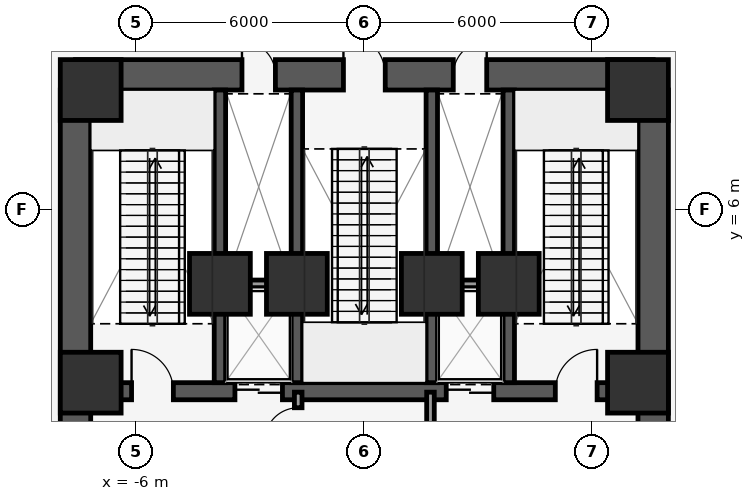
"""IFC4 building model, lengths in metres.
Left out: names, types, materials, properties, quantities, classifications, styles, units other than length and angle.
Written with IfcOpenShell. Run it as: python <this file> out.ifc"""

import sys

from ifc_helpers import new_model, si_unit, direction, frame, frame_2d, origin, origin_2d, place, context, subcontext, project, spatial, rectangle, extrude, element, fill, save


model = new_model("IFC4")
c1 = context("Model", 3, precision=1e-05, world=origin(), true_north=direction((0.0, 1.0)))
c2 = subcontext(c1, "Body", "Model", "MODEL_VIEW")
j1 = project(units=[si_unit("LENGTHUNIT", "METRE"), si_unit("PLANEANGLEUNIT", "RADIAN")], contexts=[c1])
p1 = place(None, origin())
s1 = spatial("IfcSite", under=j1, at=p1, CompositionType="ELEMENT")
p2 = place(p1, origin())
s2 = spatial("IfcBuilding", under=s1, at=p2, CompositionType="ELEMENT")
p3 = place(p2, frame((0.0, 0.0, 17.5)))
s3 = spatial("IfcBuildingStorey", under=s2, at=p3, CompositionType="ELEMENT", Elevation=17.5)
p4 = place(p3, frame((-7.6, 9.55, 0.0), z_axis=(0.0, 0.0, 1.0), x_axis=(1.0, 0.0, 0.0)))
e1 = element("IfcWall", 1, at=p4, inside=s3, PredefinedType="SHEAR", context=c2, shape_type="SweptSolid", body=[
    extrude(rectangle(XDim=15.2, YDim=0.8, at=frame_2d((7.6, 0.0))), origin(), (0.0, 0.0, 1.0), 5.7),
])
p5 = place(p4, frame((7.05, 0.0, 0.0)))
e2 = element("IfcOpeningElement", 2, at=p5, cuts=e1, PredefinedType="OPENING", context=c2, shape_type="SweptSolid", body=[
    extrude(rectangle(XDim=1.1, YDim=2.15, at=frame_2d((0.55, 1.075))), frame((0.0, 0.41, 0.0), z_axis=(0.0, -1.0, 0.0), x_axis=(1.0, 0.0, 0.0)), (0.0, 0.0, 1.0), 0.82),
])
p6 = place(p4, frame((4.38, 0.0, 0.0)))
e3 = element("IfcOpeningElement", 3, at=p6, cuts=e1, PredefinedType="OPENING", context=c2, shape_type="SweptSolid", body=[
    extrude(rectangle(XDim=0.88, YDim=2.15, at=frame_2d((0.44, 1.075))), frame((0.0, 0.41, 0.0), z_axis=(0.0, -1.0, 0.0), x_axis=(1.0, 0.0, 0.0)), (0.0, 0.0, 1.0), 0.82),
])
p7 = place(p4, frame((9.94, 0.0, 0.0)))
e4 = element("IfcOpeningElement", 4, at=p7, cuts=e1, PredefinedType="OPENING", context=c2, shape_type="SweptSolid", body=[
    extrude(rectangle(XDim=0.88, YDim=2.15, at=frame_2d((0.44, 1.075))), frame((0.0, 0.41, 0.0), z_axis=(0.0, -1.0, 0.0), x_axis=(1.0, 0.0, 0.0)), (0.0, 0.0, 1.0), 0.82),
])
p8 = place(p3, frame((-7.2, 1.225, 0.0), z_axis=(0.0, 0.0, 1.0), x_axis=(1.0, 0.0, 0.0)))
e5 = element("IfcWall", 5, at=p8, inside=s3, PredefinedType="SHEAR", context=c2, shape_type="SweptSolid", body=[
    extrude(rectangle(XDim=14.4, YDim=0.45, at=frame_2d((7.2, 0.0))), origin(), (0.0, 0.0, 1.0), 5.7),
])
p9 = place(p8, frame((3.795, 0.0, 0.0)))
e6 = element("IfcOpeningElement", 6, at=p9, cuts=e5, PredefinedType="OPENING", context=c2, shape_type="SweptSolid", body=[
    extrude(rectangle(XDim=1.25, YDim=2.25, at=frame_2d((0.625, 1.125))), frame((0.0, 0.235, 0.0), z_axis=(0.0, -1.0, 0.0), x_axis=(1.0, 0.0, 0.0)), (0.0, 0.0, 1.0), 0.47),
])
p10 = place(p8, frame((9.355, 0.0, 0.0)))
e7 = element("IfcOpeningElement", 7, at=p10, cuts=e5, PredefinedType="OPENING", context=c2, shape_type="SweptSolid", body=[
    extrude(rectangle(XDim=1.25, YDim=2.25, at=frame_2d((0.625, 1.125))), frame((0.0, 0.235, 0.0), z_axis=(0.0, -1.0, 0.0), x_axis=(1.0, 0.0, 0.0)), (0.0, 0.0, 1.0), 0.47),
])
p11 = place(p8, frame((1.075, 0.0, 0.0)))
e8 = element("IfcOpeningElement", 8, at=p11, cuts=e5, PredefinedType="OPENING", context=c2, shape_type="SweptSolid", body=[
    extrude(rectangle(XDim=1.1, YDim=2.15, at=frame_2d((0.55, 1.075))), frame((0.0, 0.235, 0.0), z_axis=(0.0, -1.0, 0.0), x_axis=(1.0, 0.0, 0.0)), (0.0, 0.0, 1.0), 0.47),
])
p12 = place(p8, frame((12.225, 0.0, 0.0)))
e9 = element("IfcOpeningElement", 9, at=p12, cuts=e5, PredefinedType="OPENING", context=c2, shape_type="SweptSolid", body=[
    extrude(rectangle(XDim=1.1, YDim=2.15, at=frame_2d((0.55, 1.075))), frame((0.0, 0.235, 0.0), z_axis=(0.0, -1.0, 0.0), x_axis=(1.0, 0.0, 0.0)), (0.0, 0.0, 1.0), 0.47),
])
for number, where, z_axis, x_axis in (
    (10, (-3.8, 1.45, 0.0), (0.0, 0.0, 1.0), (0.0, 1.0, 0.0)),
    (11, (-1.775, 1.45, 0.0), (0.0, 0.0, 1.0), (0.0, 1.0, 0.0)),
    (12, (1.775, 1.45, 0.0), (0.0, 0.0, 1.0), (0.0, 1.0, 0.0)),
    (13, (3.8, 1.45, 0.0), (0.0, 0.0, 1.0), (0.0, 1.0, 0.0)),
):
    element("IfcWall", number, at=place(p3, frame(where, z_axis=z_axis, x_axis=x_axis)), inside=s3, PredefinedType="SHEAR", context=c2, shape_type="SweptSolid", body=[
        extrude(rectangle(XDim=7.7, YDim=0.3, at=frame_2d((3.85, 0.0))), origin(), (0.0, 0.0, 1.0), 5.7),
    ])
for number, where, z_axis, x_axis in (
    (14, (-7.6, 0.1, 0.0), (0.0, 0.0, 1.0), (0.0, 1.0, 0.0)),
    (15, (7.6, 0.1, 0.0), (0.0, 0.0, 1.0), (0.0, 1.0, 0.0)),
):
    element("IfcWall", number, at=place(p3, frame(where, z_axis=z_axis, x_axis=x_axis)), inside=s3, PredefinedType="SHEAR", context=c2, shape_type="SweptSolid", body=[
        extrude(rectangle(XDim=9.05, YDim=0.8, at=frame_2d((4.525, 0.0))), origin(), (0.0, 0.0, 1.0), 5.7),
    ])
for number, where, z_axis, x_axis in (
    (16, (7.2, 1.45, 0.0), (0.0, 0.0, 1.0), (1.0, 0.0, 0.0)),
    (17, (7.2, 9.15, 0.0), (0.0, 0.0, 1.0), (1.0, 0.0, 0.0)),
    (18, (-7.2, 9.15, 0.0), (0.0, 0.0, 1.0), (1.0, 0.0, 0.0)),
    (19, (-7.2, 1.45, 0.0), (0.0, 0.0, 1.0), (1.0, 0.0, 0.0)),
    (20, (-3.8, 4.05, 0.0), (0.0, 0.0, 1.0), (1.0, 0.0, 0.0)),
    (21, (3.8, 4.05, 0.0), (0.0, 0.0, 1.0), (1.0, 0.0, 0.0)),
    (22, (-1.775, 4.05, 0.0), (0.0, 0.0, 1.0), (1.0, 0.0, 0.0)),
    (23, (1.775, 4.05, 0.0), (0.0, 0.0, 1.0), (1.0, 0.0, 0.0)),
):
    element("IfcColumn", number, at=place(p3, frame(where, z_axis=z_axis, x_axis=x_axis)), inside=s3, PredefinedType="COLUMN", context=c2, shape_type="SweptSolid", body=[
        extrude(rectangle(XDim=1.6, YDim=1.6, at=origin_2d()), origin(), (0.0, 0.0, 1.0), 6.0),
    ])
for number, where, z_axis, x_axis in (
    (24, (-3.65, 4.05, 0.0), (0.0, 0.0, 1.0), (1.0, 0.0, 0.0)),
    (25, (1.92, 4.05, 0.0), (0.0, 0.0, 1.0), (1.0, 0.0, 0.0)),
):
    element("IfcWall", number, at=place(p3, frame(where, z_axis=z_axis, x_axis=x_axis)), inside=s3, PredefinedType="PARTITIONING", context=c2, shape_type="SweptSolid", body=[
        extrude(rectangle(XDim=1.73, YDim=0.2, at=frame_2d((0.865, 0.0))), origin(), (0.0, 0.0, 1.0), 5.7),
    ])
p13 = place(p3, frame((-1.74, -1.78, 0.0), z_axis=(0.0, 0.0, 1.0), x_axis=(0.0, 1.0, 0.0)))
e26 = element("IfcWall", 26, at=p13, inside=s3, PredefinedType="PARTITIONING", context=c2, shape_type="SweptSolid", body=[
    extrude(rectangle(XDim=2.98, YDim=0.2, at=frame_2d((1.49, 0.0))), origin(), (0.0, 0.0, 1.0), 5.7),
])
p14 = place(p13, frame((1.69, 0.0, 0.0)))
e27 = element("IfcOpeningElement", 27, at=p14, cuts=e26, PredefinedType="OPENING", context=c2, shape_type="SweptSolid", body=[
    extrude(rectangle(XDim=0.88, YDim=2.15, at=frame_2d((0.44, 1.075))), frame((0.0, 0.11, 0.0), z_axis=(0.0, -1.0, 0.0), x_axis=(1.0, 0.0, 0.0)), (0.0, 0.0, 1.0), 0.22),
])
p15 = place(p3, frame((1.74, -1.78, 0.0), z_axis=(0.0, 0.0, 1.0), x_axis=(0.0, 1.0, 0.0)))
e28 = element("IfcWall", 28, at=p15, inside=s3, PredefinedType="PARTITIONING", context=c2, shape_type="SweptSolid", body=[
    extrude(rectangle(XDim=2.98, YDim=0.2, at=frame_2d((1.49, 0.0))), origin(), (0.0, 0.0, 1.0), 5.7),
])
p16 = place(p15, frame((0.24, 0.0, 0.0)))
e29 = element("IfcOpeningElement", 29, at=p16, cuts=e28, PredefinedType="OPENING", context=c2, shape_type="SweptSolid", body=[
    extrude(rectangle(XDim=0.88, YDim=2.15, at=frame_2d((0.44, 1.075))), frame((0.0, 0.11, 0.0), z_axis=(0.0, -1.0, 0.0), x_axis=(1.0, 0.0, 0.0)), (0.0, 0.0, 1.0), 0.22),
])
p17 = place(p9, origin())
e30 = element("IfcDoor", 30, at=p17, inside=s3, OperationType="DOUBLE_DOOR_SLIDING", PredefinedType="DOOR", context=c2, shape_type="SweptSolid", body=[
    extrude(rectangle(XDim=1.25, YDim=2.25, at=frame_2d((0.625, 1.125))), frame((0.0, 0.025, 0.0), z_axis=(0.0, -1.0, 0.0), x_axis=(1.0, 0.0, 0.0)), (0.0, 0.0, 1.0), 0.05),
])
fill(e6, e30)
p18 = place(p10, origin())
e31 = element("IfcDoor", 31, at=p18, inside=s3, OperationType="DOUBLE_DOOR_SLIDING", PredefinedType="DOOR", context=c2, shape_type="SweptSolid", body=[
    extrude(rectangle(XDim=1.25, YDim=2.25, at=frame_2d((0.625, 1.125))), frame((0.0, 0.025, 0.0), z_axis=(0.0, -1.0, 0.0), x_axis=(1.0, 0.0, 0.0)), (0.0, 0.0, 1.0), 0.05),
])
fill(e7, e31)
p19 = place(p11, origin())
e32 = element("IfcDoor", 32, at=p19, inside=s3, OperationType="SINGLE_SWING_LEFT", PredefinedType="DOOR", context=c2, shape_type="SweptSolid", body=[
    extrude(rectangle(XDim=1.1, YDim=2.15, at=frame_2d((0.55, 1.075))), frame((0.0, 0.025, 0.0), z_axis=(0.0, -1.0, 0.0), x_axis=(1.0, 0.0, 0.0)), (0.0, 0.0, 1.0), 0.05),
])
fill(e8, e32)
p20 = place(p12, origin())
e33 = element("IfcDoor", 33, at=p20, inside=s3, OperationType="SINGLE_SWING_RIGHT", PredefinedType="DOOR", context=c2, shape_type="SweptSolid", body=[
    extrude(rectangle(XDim=1.1, YDim=2.15, at=frame_2d((0.55, 1.075))), frame((0.0, 0.025, 0.0), z_axis=(0.0, -1.0, 0.0), x_axis=(1.0, 0.0, 0.0)), (0.0, 0.0, 1.0), 0.05),
])
fill(e9, e33)
p21 = place(p5, origin())
e34 = element("IfcDoor", 34, at=p21, inside=s3, OperationType="SINGLE_SWING_LEFT", PredefinedType="DOOR", context=c2, shape_type="SweptSolid", body=[
    extrude(rectangle(XDim=1.1, YDim=2.15, at=frame_2d((0.55, 1.075))), frame((0.0, 0.025, 0.0), z_axis=(0.0, -1.0, 0.0), x_axis=(1.0, 0.0, 0.0)), (0.0, 0.0, 1.0), 0.05),
])
fill(e2, e34)
p22 = place(p6, origin())
e35 = element("IfcDoor", 35, at=p22, inside=s3, OperationType="SINGLE_SWING_LEFT", PredefinedType="DOOR", context=c2, shape_type="SweptSolid", body=[
    extrude(rectangle(XDim=0.88, YDim=2.15, at=frame_2d((0.44, 1.075))), frame((0.0, 0.025, 0.0), z_axis=(0.0, -1.0, 0.0), x_axis=(1.0, 0.0, 0.0)), (0.0, 0.0, 1.0), 0.05),
])
fill(e3, e35)
p23 = place(p7, origin())
e36 = element("IfcDoor", 36, at=p23, inside=s3, OperationType="SINGLE_SWING_RIGHT", PredefinedType="DOOR", context=c2, shape_type="SweptSolid", body=[
    extrude(rectangle(XDim=0.88, YDim=2.15, at=frame_2d((0.44, 1.075))), frame((0.0, 0.025, 0.0), z_axis=(0.0, -1.0, 0.0), x_axis=(1.0, 0.0, 0.0)), (0.0, 0.0, 1.0), 0.05),
])
fill(e4, e36)
p24 = place(p14, origin())
e37 = element("IfcDoor", 37, at=p24, inside=s3, OperationType="SINGLE_SWING_LEFT", PredefinedType="DOOR", context=c2, shape_type="SweptSolid", body=[
    extrude(rectangle(XDim=0.88, YDim=2.15, at=frame_2d((0.44, 1.075))), frame((0.0, 0.025, 0.0), z_axis=(0.0, -1.0, 0.0), x_axis=(1.0, 0.0, 0.0)), (0.0, 0.0, 1.0), 0.05),
])
fill(e27, e37)
save(model, sys.argv[1])
